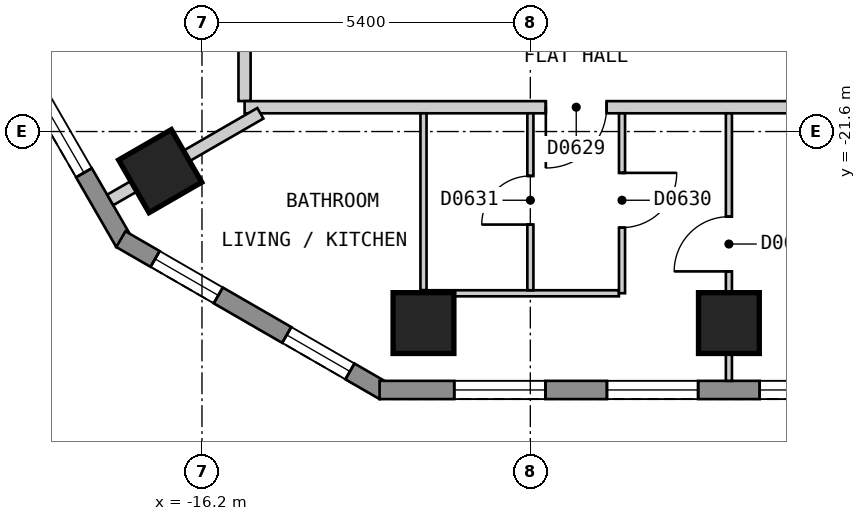
"""IFC4 building model, lengths in metres.
Left out: names, types, materials, properties, quantities, classifications, styles, units other than length and angle.
Written with IfcOpenShell. Run it as: python <this file> out.ifc"""

import sys

from ifc_helpers import new_model, si_unit, direction, frame, frame_2d, origin, origin_2d, place, context, subcontext, project, spatial, polyline, rectangle, outline, extrude, element, fill, save


model = new_model("IFC4")
c1 = context("Model", 3, precision=1e-05, world=origin(), true_north=direction((0.0, 1.0)))
c2 = subcontext(c1, "Body", "Model", "MODEL_VIEW")
j1 = project(units=[si_unit("LENGTHUNIT", "METRE"), si_unit("PLANEANGLEUNIT", "RADIAN")], contexts=[c1])
p1 = place(None, origin())
s1 = spatial("IfcSite", under=j1, at=p1, CompositionType="ELEMENT")
p2 = place(p1, origin())
s2 = spatial("IfcBuilding", under=s1, at=p2, CompositionType="ELEMENT")
p3 = place(p2, frame((0.0, 0.0, 75.0)))
s3 = spatial("IfcBuildingStorey", under=s2, at=p3, CompositionType="ELEMENT", Elevation=75.0)
for number, where, z_axis, x_axis in (
    (1, (-16.887, -22.251, 0.0), (0.0, 0.0, 1.0), (0.5, -0.866, 0.0)),
    (2, (-12.557, -24.75, 0.0), (0.0, 0.0, 1.0), (1.0, 0.0, 0.0)),
    (3, (-7.534, -24.75, 0.0), (0.0, 0.0, 1.0), (1.0, 0.0, 0.0)),
):
    element("IfcColumn", number, at=place(p3, frame(where, z_axis=z_axis, x_axis=x_axis)), inside=s3, PredefinedType="COLUMN", context=c2, shape_type="SweptSolid", body=[
        extrude(rectangle(XDim=1.0, YDim=1.0, at=origin_2d()), origin(), (0.0, 0.0, 1.0), 3.0),
    ])
p4 = place(p3, frame((-29.027, -3.425, 0.0), z_axis=(0.0, 0.0, 1.0), x_axis=(0.500035407905, -0.866004960056, 0.0)))
e4 = element("IfcWall", 4, at=p4, inside=s3, PredefinedType="SOLIDWALL", context=c2, shape_type="SweptSolid", body=[
    extrude(outline(polyline([(0.0, -0.15), (23.094, -0.15), (23.014, 0.15), (0.08, 0.15), (0.0, -0.15)])), origin(), (0.0, 0.0, 1.0), 2.7),
])
p5 = place(p4, frame((1.324, 0.0, 0.15)))
e5 = element("IfcOpeningElement", 5, at=p5, cuts=e4, PredefinedType="OPENING", context=c2, shape_type="SweptSolid", body=[
    extrude(rectangle(XDim=1.5, YDim=2.1, at=frame_2d((0.75, 1.05))), frame((0.0, 0.16, 0.0), z_axis=(0.0, -1.0, 0.0), x_axis=(1.0, 0.0, 0.0)), (0.0, 0.0, 1.0), 0.32),
])
p6 = place(p4, frame((4.031, 0.0, 0.15)))
e6 = element("IfcOpeningElement", 6, at=p6, cuts=e4, PredefinedType="OPENING", context=c2, shape_type="SweptSolid", body=[
    extrude(rectangle(XDim=1.5, YDim=2.1, at=frame_2d((0.75, 1.05))), frame((0.0, 0.16, 0.0), z_axis=(0.0, -1.0, 0.0), x_axis=(1.0, 0.0, 0.0)), (0.0, 0.0, 1.0), 0.32),
])
p7 = place(p4, frame((6.737, 0.0, 0.15)))
e7 = element("IfcOpeningElement", 7, at=p7, cuts=e4, PredefinedType="OPENING", context=c2, shape_type="SweptSolid", body=[
    extrude(rectangle(XDim=1.5, YDim=2.1, at=frame_2d((0.75, 1.05))), frame((0.0, 0.16, 0.0), z_axis=(0.0, -1.0, 0.0), x_axis=(1.0, 0.0, 0.0)), (0.0, 0.0, 1.0), 0.32),
])
p8 = place(p4, frame((9.444, 0.0, 0.15)))
e8 = element("IfcOpeningElement", 8, at=p8, cuts=e4, PredefinedType="OPENING", context=c2, shape_type="SweptSolid", body=[
    extrude(rectangle(XDim=1.5, YDim=2.1, at=frame_2d((0.75, 1.05))), frame((0.0, 0.16, 0.0), z_axis=(0.0, -1.0, 0.0), x_axis=(1.0, 0.0, 0.0)), (0.0, 0.0, 1.0), 0.32),
])
p9 = place(p4, frame((12.151, 0.0, 0.15)))
e9 = element("IfcOpeningElement", 9, at=p9, cuts=e4, PredefinedType="OPENING", context=c2, shape_type="SweptSolid", body=[
    extrude(rectangle(XDim=1.5, YDim=2.1, at=frame_2d((0.75, 1.05))), frame((0.0, 0.16, 0.0), z_axis=(0.0, -1.0, 0.0), x_axis=(1.0, 0.0, 0.0)), (0.0, 0.0, 1.0), 0.32),
])
p10 = place(p4, frame((14.857, 0.0, 0.15)))
e10 = element("IfcOpeningElement", 10, at=p10, cuts=e4, PredefinedType="OPENING", context=c2, shape_type="SweptSolid", body=[
    extrude(rectangle(XDim=1.5, YDim=2.1, at=frame_2d((0.75, 1.05))), frame((0.0, 0.16, 0.0), z_axis=(0.0, -1.0, 0.0), x_axis=(1.0, 0.0, 0.0)), (0.0, 0.0, 1.0), 0.32),
])
p11 = place(p4, frame((17.564, 0.0, 0.15)))
e11 = element("IfcOpeningElement", 11, at=p11, cuts=e4, PredefinedType="OPENING", context=c2, shape_type="SweptSolid", body=[
    extrude(rectangle(XDim=1.5, YDim=2.1, at=frame_2d((0.75, 1.05))), frame((0.0, 0.16, 0.0), z_axis=(0.0, -1.0, 0.0), x_axis=(1.0, 0.0, 0.0)), (0.0, 0.0, 1.0), 0.32),
])
p12 = place(p4, frame((20.27, 0.0, 0.15)))
e12 = element("IfcOpeningElement", 12, at=p12, cuts=e4, PredefinedType="OPENING", context=c2, shape_type="SweptSolid", body=[
    extrude(rectangle(XDim=1.5, YDim=2.1, at=frame_2d((0.75, 1.05))), frame((0.0, 0.16, 0.0), z_axis=(0.0, -1.0, 0.0), x_axis=(1.0, 0.0, 0.0)), (0.0, 0.0, 1.0), 0.32),
])
p13 = place(p3, frame((-17.534, -23.37, 0.0), z_axis=(0.0, 0.0, 1.0), x_axis=(0.866010750942, -0.50002537861, 0.0)))
e13 = element("IfcWall", 13, at=p13, inside=s3, PredefinedType="SOLIDWALL", context=c2, shape_type="SweptSolid", body=[
    extrude(outline(polyline([(0.0, -0.15), (5.0, -0.15), (4.919, 0.15), (0.08, 0.15), (0.0, -0.15)])), origin(), (0.0, 0.0, 1.0), 2.7),
])
p14 = place(p13, frame((0.65, 0.0, 0.15)))
e14 = element("IfcOpeningElement", 14, at=p14, cuts=e13, PredefinedType="OPENING", context=c2, shape_type="SweptSolid", body=[
    extrude(rectangle(XDim=1.2, YDim=2.1, at=frame_2d((0.6, 1.05))), frame((0.0, 0.16, 0.0), z_axis=(0.0, -1.0, 0.0), x_axis=(1.0, 0.0, 0.0)), (0.0, 0.0, 1.0), 0.32),
])
p15 = place(p13, frame((3.15, 0.0, 0.15)))
e15 = element("IfcOpeningElement", 15, at=p15, cuts=e13, PredefinedType="OPENING", context=c2, shape_type="SweptSolid", body=[
    extrude(rectangle(XDim=1.2, YDim=2.1, at=frame_2d((0.6, 1.05))), frame((0.0, 0.16, 0.0), z_axis=(0.0, -1.0, 0.0), x_axis=(1.0, 0.0, 0.0)), (0.0, 0.0, 1.0), 0.32),
])
p16 = place(p3, frame((-13.279, -25.85, 0.0), z_axis=(0.0, 0.0, 1.0), x_axis=(1.0, 0.0, 0.0)))
e16 = element("IfcWall", 16, at=p16, inside=s3, PredefinedType="SOLIDWALL", context=c2, shape_type="SweptSolid", body=[
    extrude(outline(polyline([(0.0, -0.15), (26.558, -0.15), (26.478, 0.15), (0.08, 0.15), (0.0, -0.15)])), origin(), (0.0, 0.0, 1.0), 2.7),
])
p17 = place(p16, frame((1.228, 0.0, 0.15)))
e17 = element("IfcOpeningElement", 17, at=p17, cuts=e16, PredefinedType="OPENING", context=c2, shape_type="SweptSolid", body=[
    extrude(rectangle(XDim=1.5, YDim=2.1, at=frame_2d((0.75, 1.05))), frame((0.0, 0.16, 0.0), z_axis=(0.0, -1.0, 0.0), x_axis=(1.0, 0.0, 0.0)), (0.0, 0.0, 1.0), 0.32),
])
p18 = place(p16, frame((3.739, 0.0, 0.15)))
e18 = element("IfcOpeningElement", 18, at=p18, cuts=e16, PredefinedType="OPENING", context=c2, shape_type="SweptSolid", body=[
    extrude(rectangle(XDim=1.5, YDim=2.1, at=frame_2d((0.75, 1.05))), frame((0.0, 0.16, 0.0), z_axis=(0.0, -1.0, 0.0), x_axis=(1.0, 0.0, 0.0)), (0.0, 0.0, 1.0), 0.32),
])
p19 = place(p16, frame((6.251, 0.0, 0.15)))
e19 = element("IfcOpeningElement", 19, at=p19, cuts=e16, PredefinedType="OPENING", context=c2, shape_type="SweptSolid", body=[
    extrude(rectangle(XDim=1.5, YDim=2.1, at=frame_2d((0.75, 1.05))), frame((0.0, 0.16, 0.0), z_axis=(0.0, -1.0, 0.0), x_axis=(1.0, 0.0, 0.0)), (0.0, 0.0, 1.0), 0.32),
])
p20 = place(p16, frame((8.762, 0.0, 0.15)))
e20 = element("IfcOpeningElement", 20, at=p20, cuts=e16, PredefinedType="OPENING", context=c2, shape_type="SweptSolid", body=[
    extrude(rectangle(XDim=1.5, YDim=2.1, at=frame_2d((0.75, 1.05))), frame((0.0, 0.16, 0.0), z_axis=(0.0, -1.0, 0.0), x_axis=(1.0, 0.0, 0.0)), (0.0, 0.0, 1.0), 0.32),
])
p21 = place(p16, frame((11.274, 0.0, 0.15)))
e21 = element("IfcOpeningElement", 21, at=p21, cuts=e16, PredefinedType="OPENING", context=c2, shape_type="SweptSolid", body=[
    extrude(rectangle(XDim=1.5, YDim=2.1, at=frame_2d((0.75, 1.05))), frame((0.0, 0.16, 0.0), z_axis=(0.0, -1.0, 0.0), x_axis=(1.0, 0.0, 0.0)), (0.0, 0.0, 1.0), 0.32),
])
p22 = place(p16, frame((13.785, 0.0, 0.15)))
e22 = element("IfcOpeningElement", 22, at=p22, cuts=e16, PredefinedType="OPENING", context=c2, shape_type="SweptSolid", body=[
    extrude(rectangle(XDim=1.5, YDim=2.1, at=frame_2d((0.75, 1.05))), frame((0.0, 0.16, 0.0), z_axis=(0.0, -1.0, 0.0), x_axis=(1.0, 0.0, 0.0)), (0.0, 0.0, 1.0), 0.32),
])
p23 = place(p16, frame((16.297, 0.0, 0.15)))
e23 = element("IfcOpeningElement", 23, at=p23, cuts=e16, PredefinedType="OPENING", context=c2, shape_type="SweptSolid", body=[
    extrude(rectangle(XDim=1.5, YDim=2.1, at=frame_2d((0.75, 1.05))), frame((0.0, 0.16, 0.0), z_axis=(0.0, -1.0, 0.0), x_axis=(1.0, 0.0, 0.0)), (0.0, 0.0, 1.0), 0.32),
])
p24 = place(p16, frame((18.808, 0.0, 0.15)))
e24 = element("IfcOpeningElement", 24, at=p24, cuts=e16, PredefinedType="OPENING", context=c2, shape_type="SweptSolid", body=[
    extrude(rectangle(XDim=1.5, YDim=2.1, at=frame_2d((0.75, 1.05))), frame((0.0, 0.16, 0.0), z_axis=(0.0, -1.0, 0.0), x_axis=(1.0, 0.0, 0.0)), (0.0, 0.0, 1.0), 0.32),
])
p25 = place(p16, frame((21.32, 0.0, 0.15)))
e25 = element("IfcOpeningElement", 25, at=p25, cuts=e16, PredefinedType="OPENING", context=c2, shape_type="SweptSolid", body=[
    extrude(rectangle(XDim=1.5, YDim=2.1, at=frame_2d((0.75, 1.05))), frame((0.0, 0.16, 0.0), z_axis=(0.0, -1.0, 0.0), x_axis=(1.0, 0.0, 0.0)), (0.0, 0.0, 1.0), 0.32),
])
p26 = place(p16, frame((23.831, 0.0, 0.15)))
e26 = element("IfcOpeningElement", 26, at=p26, cuts=e16, PredefinedType="OPENING", context=c2, shape_type="SweptSolid", body=[
    extrude(rectangle(XDim=1.5, YDim=2.1, at=frame_2d((0.75, 1.05))), frame((0.0, 0.16, 0.0), z_axis=(0.0, -1.0, 0.0), x_axis=(1.0, 0.0, 0.0)), (0.0, 0.0, 1.0), 0.32),
])
p27 = place(p3, frame((-15.5, -16.501, 0.0), z_axis=(0.0, 0.0, 1.0), x_axis=(0.0, -1.0, 0.0)))
e27 = element("IfcWall", 27, at=p27, inside=s3, PredefinedType="PARTITIONING", context=c2, shape_type="SweptSolid", body=[
    extrude(rectangle(XDim=4.598, YDim=0.2, at=frame_2d((2.299, 0.0))), origin(), (0.0, 0.0, 1.0), 2.7),
])
p28 = place(p3, frame((-15.499, -21.2, 0.0), z_axis=(0.0, 0.0, 1.0), x_axis=(1.0, 0.0, 0.0)))
e28 = element("IfcWall", 28, at=p28, inside=s3, PredefinedType="PARTITIONING", context=c2, shape_type="SweptSolid", body=[
    extrude(rectangle(XDim=30.898, YDim=0.2, at=frame_2d((15.449, 0.0))), origin(), (0.0, 0.0, 1.0), 2.7),
])
p29 = place(p28, frame((4.954, 0.0, 0.0)))
e29 = element("IfcOpeningElement", 29, at=p29, cuts=e28, PredefinedType="OPENING", context=c2, shape_type="SweptSolid", body=[
    extrude(rectangle(XDim=1.0, YDim=2.1, at=frame_2d((0.5, 1.05))), frame((0.0, 0.11, 0.0), z_axis=(0.0, -1.0, 0.0), x_axis=(1.0, 0.0, 0.0)), (0.0, 0.0, 1.0), 0.22),
])
p30 = place(p28, frame((25.046, 0.0, 0.0)))
e30 = element("IfcOpeningElement", 30, at=p30, cuts=e28, PredefinedType="OPENING", context=c2, shape_type="SweptSolid", body=[
    extrude(rectangle(XDim=1.0, YDim=2.1, at=frame_2d((0.5, 1.05))), frame((0.0, 0.11, 0.0), z_axis=(0.0, -1.0, 0.0), x_axis=(1.0, 0.0, 0.0)), (0.0, 0.0, 1.0), 0.22),
])
p31 = place(p3, frame((-7.534, -21.3, 0.0), z_axis=(0.0, 0.0, 1.0), x_axis=(0.0, -1.0, 0.0)))
e31 = element("IfcWall", 31, at=p31, inside=s3, PredefinedType="PARTITIONING", context=c2, shape_type="SweptSolid", body=[
    extrude(rectangle(XDim=4.4, YDim=0.1, at=frame_2d((2.2, 0.0))), origin(), (0.0, 0.0, 1.0), 2.7),
])
p32 = place(p31, frame((1.7, 0.0, 0.0)))
e32 = element("IfcOpeningElement", 32, at=p32, cuts=e31, PredefinedType="OPENING", context=c2, shape_type="SweptSolid", body=[
    extrude(rectangle(XDim=0.9, YDim=2.1, at=frame_2d((0.45, 1.05))), frame((0.0, 0.06, 0.0), z_axis=(0.0, -1.0, 0.0), x_axis=(1.0, 0.0, 0.0)), (0.0, 0.0, 1.0), 0.12),
])
p33 = place(p3, frame((-12.557, -21.3, 0.0), z_axis=(0.0, 0.0, 1.0), x_axis=(0.0, -1.0, 0.0)))
e33 = element("IfcWall", 33, at=p33, inside=s3, PredefinedType="PARTITIONING", context=c2, shape_type="SweptSolid", body=[
    extrude(rectangle(XDim=2.909, YDim=0.1, at=frame_2d((1.455, 0.0))), origin(), (0.0, 0.0, 1.0), 2.7),
])
p34 = place(p3, frame((-12.556, -24.26, 0.0), z_axis=(0.0, 0.0, 1.0), x_axis=(1.0, 0.0, 0.0)))
e34 = element("IfcWall", 34, at=p34, inside=s3, PredefinedType="PARTITIONING", context=c2, shape_type="SweptSolid", body=[
    extrude(rectangle(XDim=3.213, YDim=0.1, at=frame_2d((1.606, 0.0))), origin(), (0.0, 0.0, 1.0), 2.7),
])
p35 = place(p3, frame((-9.292, -24.259, 0.0), z_axis=(0.0, 0.0, 1.0), x_axis=(0.0, 1.0, 0.0)))
e35 = element("IfcWall", 35, at=p35, inside=s3, PredefinedType="PARTITIONING", context=c2, shape_type="SweptSolid", body=[
    extrude(rectangle(XDim=2.959, YDim=0.1, at=frame_2d((1.479, 0.0))), origin(), (0.0, 0.0, 1.0), 2.7),
])
p36 = place(p35, frame((1.079, 0.0, 0.0)))
e36 = element("IfcOpeningElement", 36, at=p36, cuts=e35, PredefinedType="OPENING", context=c2, shape_type="SweptSolid", body=[
    extrude(rectangle(XDim=0.9, YDim=2.1, at=frame_2d((0.45, 1.05))), frame((0.0, 0.06, 0.0), z_axis=(0.0, -1.0, 0.0), x_axis=(1.0, 0.0, 0.0)), (0.0, 0.0, 1.0), 0.12),
])
p37 = place(p3, frame((-10.799, -24.21, 0.0), z_axis=(0.0, 0.0, 1.0), x_axis=(0.0, 1.0, 0.0)))
e37 = element("IfcWall", 37, at=p37, inside=s3, PredefinedType="PARTITIONING", context=c2, shape_type="SweptSolid", body=[
    extrude(rectangle(XDim=2.91, YDim=0.1, at=frame_2d((1.455, 0.0))), origin(), (0.0, 0.0, 1.0), 2.7),
])
p38 = place(p37, frame((1.08, 0.0, 0.0)))
e38 = element("IfcOpeningElement", 38, at=p38, cuts=e37, PredefinedType="OPENING", context=c2, shape_type="SweptSolid", body=[
    extrude(rectangle(XDim=0.8, YDim=2.1, at=frame_2d((0.4, 1.05))), frame((0.0, 0.06, 0.0), z_axis=(0.0, -1.0, 0.0), x_axis=(1.0, 0.0, 0.0)), (0.0, 0.0, 1.0), 0.12),
])
p39 = place(p3, frame((-17.709, -22.725, 0.0), z_axis=(0.0, 0.0, 1.0), x_axis=(0.866090043625, 0.499888023795, 0.0)))
e39 = element("IfcWall", 39, at=p39, inside=s3, PredefinedType="PARTITIONING", context=c2, shape_type="SweptSolid", body=[
    extrude(rectangle(XDim=2.851, YDim=0.2, at=frame_2d((1.425, 0.0))), origin(), (0.0, 0.0, 1.0), 2.7),
])
p40 = place(p12, origin())
e40 = element("IfcWindow", 40, at=p40, inside=s3, PartitioningType="SINGLE_PANEL", PredefinedType="WINDOW", context=c2, shape_type="SweptSolid", body=[
    extrude(rectangle(XDim=1.5, YDim=2.1, at=frame_2d((0.75, 1.05))), frame((0.0, 0.03, 0.0), z_axis=(0.0, -1.0, 0.0), x_axis=(1.0, 0.0, 0.0)), (0.0, 0.0, 1.0), 0.06),
])
fill(e12, e40)
p41 = place(p14, origin())
e41 = element("IfcWindow", 41, at=p41, inside=s3, PartitioningType="SINGLE_PANEL", PredefinedType="WINDOW", context=c2, shape_type="SweptSolid", body=[
    extrude(rectangle(XDim=1.2, YDim=2.1, at=frame_2d((0.6, 1.05))), frame((0.0, 0.03, 0.0), z_axis=(0.0, -1.0, 0.0), x_axis=(1.0, 0.0, 0.0)), (0.0, 0.0, 1.0), 0.06),
])
fill(e14, e41)
p42 = place(p15, origin())
e42 = element("IfcWindow", 42, at=p42, inside=s3, PartitioningType="SINGLE_PANEL", PredefinedType="WINDOW", context=c2, shape_type="SweptSolid", body=[
    extrude(rectangle(XDim=1.2, YDim=2.1, at=frame_2d((0.6, 1.05))), frame((0.0, 0.03, 0.0), z_axis=(0.0, -1.0, 0.0), x_axis=(1.0, 0.0, 0.0)), (0.0, 0.0, 1.0), 0.06),
])
fill(e15, e42)
p43 = place(p17, origin())
e43 = element("IfcWindow", 43, at=p43, inside=s3, PartitioningType="SINGLE_PANEL", PredefinedType="WINDOW", context=c2, shape_type="SweptSolid", body=[
    extrude(rectangle(XDim=1.5, YDim=2.1, at=frame_2d((0.75, 1.05))), frame((0.0, 0.03, 0.0), z_axis=(0.0, -1.0, 0.0), x_axis=(1.0, 0.0, 0.0)), (0.0, 0.0, 1.0), 0.06),
])
fill(e17, e43)
p44 = place(p18, origin())
e44 = element("IfcWindow", 44, at=p44, inside=s3, PartitioningType="SINGLE_PANEL", PredefinedType="WINDOW", context=c2, shape_type="SweptSolid", body=[
    extrude(rectangle(XDim=1.5, YDim=2.1, at=frame_2d((0.75, 1.05))), frame((0.0, 0.03, 0.0), z_axis=(0.0, -1.0, 0.0), x_axis=(1.0, 0.0, 0.0)), (0.0, 0.0, 1.0), 0.06),
])
fill(e18, e44)
p45 = place(p19, origin())
e45 = element("IfcWindow", 45, at=p45, inside=s3, PartitioningType="SINGLE_PANEL", PredefinedType="WINDOW", context=c2, shape_type="SweptSolid", body=[
    extrude(rectangle(XDim=1.5, YDim=2.1, at=frame_2d((0.75, 1.05))), frame((0.0, 0.03, 0.0), z_axis=(0.0, -1.0, 0.0), x_axis=(1.0, 0.0, 0.0)), (0.0, 0.0, 1.0), 0.06),
])
fill(e19, e45)
p46 = place(p29, origin())
e46 = element("IfcDoor", 46, at=p46, inside=s3, OperationType="SINGLE_SWING_LEFT", PredefinedType="DOOR", context=c2, shape_type="SweptSolid", body=[
    extrude(rectangle(XDim=1.0, YDim=2.1, at=frame_2d((0.5, 1.05))), frame((0.0, 0.025, 0.0), z_axis=(0.0, -1.0, 0.0), x_axis=(1.0, 0.0, 0.0)), (0.0, 0.0, 1.0), 0.05),
])
fill(e29, e46)
p47 = place(p36, origin())
e47 = element("IfcDoor", 47, at=p47, inside=s3, OperationType="SINGLE_SWING_RIGHT", PredefinedType="DOOR", context=c2, shape_type="SweptSolid", body=[
    extrude(rectangle(XDim=0.9, YDim=2.1, at=frame_2d((0.45, 1.05))), frame((0.0, 0.025, 0.0), z_axis=(0.0, -1.0, 0.0), x_axis=(1.0, 0.0, 0.0)), (0.0, 0.0, 1.0), 0.05),
])
fill(e36, e47)
p48 = place(p38, origin())
e48 = element("IfcDoor", 48, at=p48, inside=s3, OperationType="SINGLE_SWING_LEFT", PredefinedType="DOOR", context=c2, shape_type="SweptSolid", body=[
    extrude(rectangle(XDim=0.8, YDim=2.1, at=frame_2d((0.4, 1.05))), frame((0.0, 0.025, 0.0), z_axis=(0.0, -1.0, 0.0), x_axis=(1.0, 0.0, 0.0)), (0.0, 0.0, 1.0), 0.05),
])
fill(e38, e48)
p49 = place(p32, origin())
e49 = element("IfcDoor", 49, at=p49, inside=s3, OperationType="SINGLE_SWING_RIGHT", PredefinedType="DOOR", context=c2, shape_type="SweptSolid", body=[
    extrude(rectangle(XDim=0.9, YDim=2.1, at=frame_2d((0.45, 1.05))), frame((0.0, 0.025, 0.0), z_axis=(0.0, -1.0, 0.0), x_axis=(1.0, 0.0, 0.0)), (0.0, 0.0, 1.0), 0.05),
])
fill(e32, e49)
save(model, sys.argv[1])
